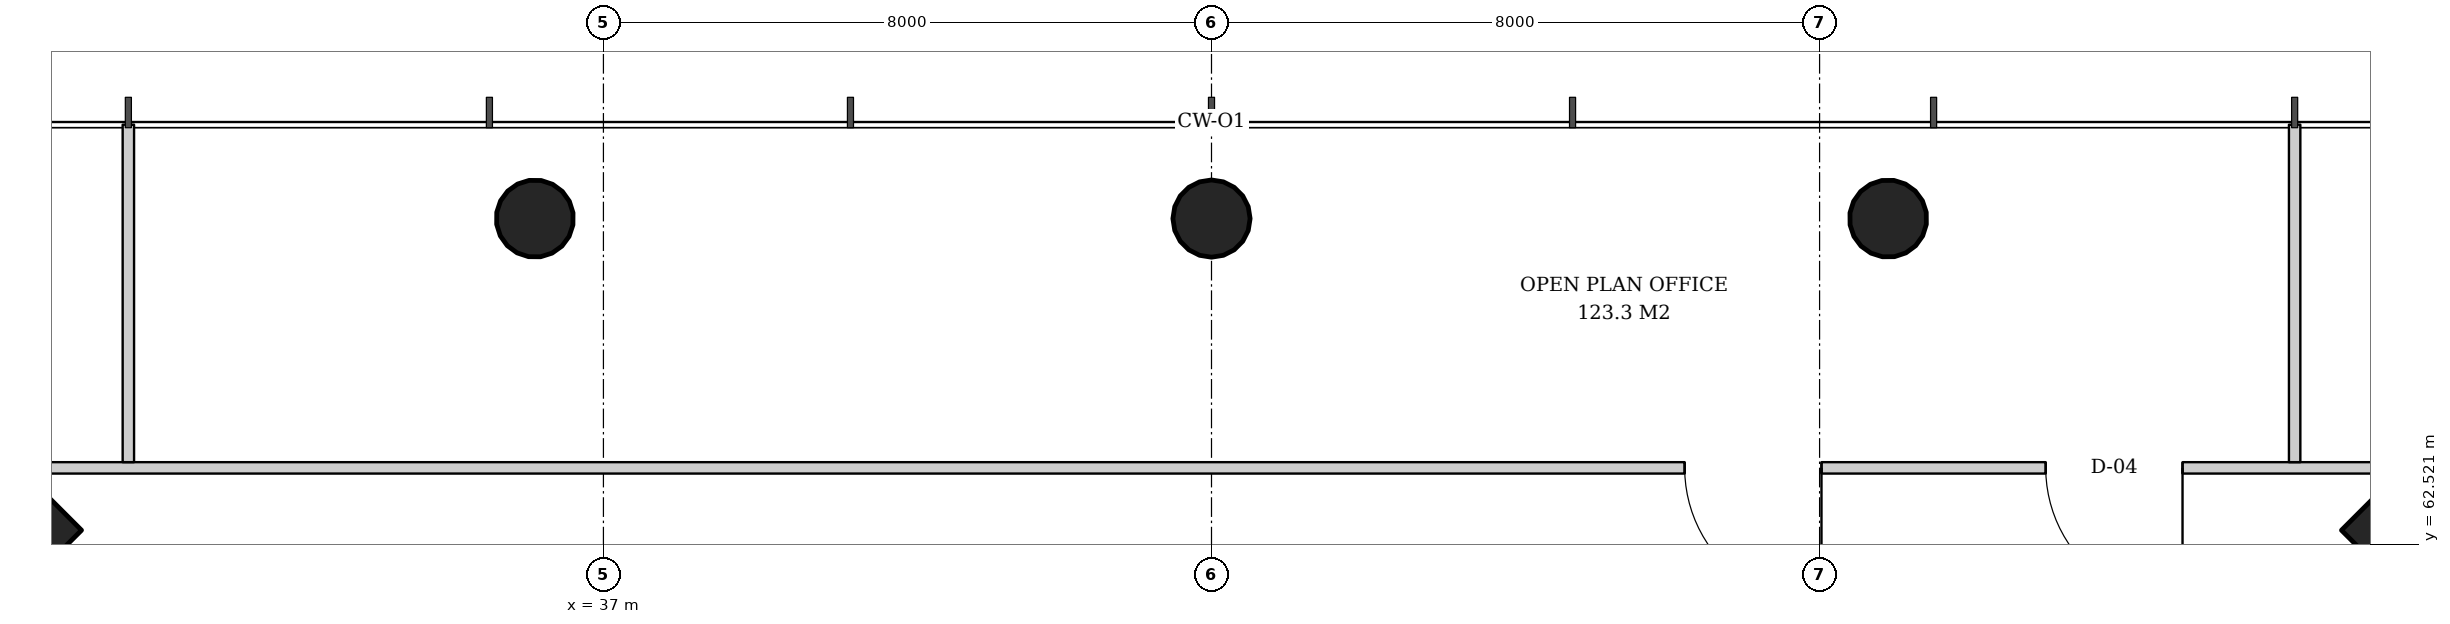
"""IFC4 building model, lengths in metres.
Left out: names, types, materials, properties, quantities, classifications, styles, units other than length and angle.
Written with IfcOpenShell. Run it as: python <this file> out.ifc"""

import sys

from ifc_helpers import new_model, si_unit, direction, frame, frame_2d, origin, origin_2d, place, context, subcontext, project, spatial, rectangle, hollow_circle, extrude, element, fill, save


model = new_model("IFC4")
c1 = context("Model", 3, precision=1e-05, world=origin(), true_north=direction((0.0, 1.0)))
c2 = subcontext(c1, "Body", "Model", "MODEL_VIEW")
j1 = project(units=[si_unit("LENGTHUNIT", "METRE"), si_unit("PLANEANGLEUNIT", "RADIAN")], contexts=[c1])
p1 = place(None, origin())
s1 = spatial("IfcSite", under=j1, at=p1, CompositionType="ELEMENT")
p2 = place(p1, origin())
s2 = spatial("IfcBuilding", under=s1, at=p2, CompositionType="ELEMENT")
p3 = place(p2, frame((0.0, 0.0, 119.8)))
s3 = spatial("IfcBuildingStorey", under=s2, at=p3, CompositionType="ELEMENT", Elevation=119.8)
for number, where, z_axis, x_axis in (
    (1, (61.743, 62.743, 0.0), (-0.032, -0.032, 0.999), (0.707, -0.707, 0.0)),
    (2, (28.257, 62.743, 0.0), (0.032, -0.032, 0.999), (0.707, 0.707, 0.0)),
):
    element("IfcColumn", number, at=place(p3, frame(where, z_axis=z_axis, x_axis=x_axis)), inside=s3, PredefinedType="COLUMN", context=c2, shape_type="SweptSolid", body=[
        extrude(rectangle(XDim=2.6, YDim=2.6, at=origin_2d()), origin(), (0.0, 0.0, 1.0), 3.804),
    ])
p4 = place(p3, frame((53.921, 66.843, 0.0), z_axis=(-0.015987237665, -0.031910269556, 0.999362868496), x_axis=(0.894067115991, -0.447933021895, 0.0)))
e3 = element("IfcColumn", 3, at=p4, inside=s3, PredefinedType="COLUMN", context=c2, shape_type="SweptSolid", body=[
    extrude(hollow_circle(Radius=0.508, WallThickness=0.04, at=origin_2d()), origin(), (0.0, 0.0, 1.0), 3.802),
])
p5 = place(p3, frame((45.0, 66.843, 0.0), z_axis=(0.0, -0.031914348339, 0.999490607445), x_axis=(1.0, 0.0, 0.0)))
e4 = element("IfcColumn", 4, at=p5, inside=s3, PredefinedType="COLUMN", context=c2, shape_type="SweptSolid", body=[
    extrude(hollow_circle(Radius=0.508, WallThickness=0.04, at=origin_2d()), origin(), (0.0, 0.0, 1.0), 3.802),
])
p6 = place(p3, frame((36.079, 66.843, 0.0), z_axis=(0.015987237665, -0.031910269556, 0.999362868496), x_axis=(0.894067115991, 0.447933021895, 0.0)))
e5 = element("IfcColumn", 5, at=p6, inside=s3, PredefinedType="COLUMN", context=c2, shape_type="SweptSolid", body=[
    extrude(hollow_circle(Radius=0.508, WallThickness=0.04, at=origin_2d()), origin(), (0.0, 0.0, 1.0), 3.802),
])
p7 = place(p3, frame((60.612, 63.525, 0.0), z_axis=(0.0, 0.0, 1.0), x_axis=(-1.0, 0.0, 0.0)))
e6 = element("IfcWall", 6, at=p7, inside=s3, PredefinedType="PARTITIONING", context=c2, shape_type="SweptSolid", body=[
    extrude(rectangle(XDim=31.223, YDim=0.15, at=frame_2d((15.612, 0.0))), origin(), (0.0, 0.0, 1.0), 2.72),
])
p8 = place(p7, frame((2.836, 0.0, 0.0)))
e7 = element("IfcOpeningElement", 7, at=p8, cuts=e6, PredefinedType="OPENING", context=c2, shape_type="SweptSolid", body=[
    extrude(rectangle(XDim=1.8, YDim=2.4, at=frame_2d((0.9, 1.2))), frame((0.0, 0.085, 0.0), z_axis=(0.0, -1.0, 0.0), x_axis=(1.0, 0.0, 0.0)), (0.0, 0.0, 1.0), 0.17),
])
p9 = place(p7, frame((7.586, 0.0, 0.0)))
e8 = element("IfcOpeningElement", 8, at=p9, cuts=e6, PredefinedType="OPENING", context=c2, shape_type="SweptSolid", body=[
    extrude(rectangle(XDim=1.8, YDim=2.4, at=frame_2d((0.9, 1.2))), frame((0.0, 0.085, 0.0), z_axis=(0.0, -1.0, 0.0), x_axis=(1.0, 0.0, 0.0)), (0.0, 0.0, 1.0), 0.17),
])
for number, where, z_axis, x_axis in (
    (9, (59.25, 63.6, 0.0), (0.0, 0.0, 1.0), (0.0, 1.0, 0.0)),
    (10, (30.75, 63.6, 0.0), (0.0, 0.0, 1.0), (0.0, 1.0, 0.0)),
):
    element("IfcWall", number, at=place(p3, frame(where, z_axis=z_axis, x_axis=x_axis)), inside=s3, PredefinedType="PARTITIONING", context=c2, shape_type="SweptSolid", body=[
        extrude(rectangle(XDim=4.44, YDim=0.15, at=frame_2d((2.22, 0.0))), origin(), (0.0, 0.0, 1.0), 2.82),
    ])
p10 = place(p8, origin())
e11 = element("IfcDoor", 11, at=p10, inside=s3, OperationType="DOUBLE_DOOR_SINGLE_SWING", PredefinedType="DOOR", context=c2, shape_type="SweptSolid", body=[
    extrude(rectangle(XDim=1.8, YDim=2.4, at=frame_2d((0.9, 1.2))), frame((0.0, 0.025, 0.0), z_axis=(0.0, -1.0, 0.0), x_axis=(1.0, 0.0, 0.0)), (0.0, 0.0, 1.0), 0.05),
])
fill(e7, e11)
p11 = place(p9, origin())
e12 = element("IfcDoor", 12, at=p11, inside=s3, OperationType="DOUBLE_DOOR_SINGLE_SWING", PredefinedType="DOOR", context=c2, shape_type="SweptSolid", body=[
    extrude(rectangle(XDim=1.8, YDim=2.4, at=frame_2d((0.9, 1.2))), frame((0.0, 0.025, 0.0), z_axis=(0.0, -1.0, 0.0), x_axis=(1.0, 0.0, 0.0)), (0.0, 0.0, 1.0), 0.05),
])
fill(e8, e12)
save(model, sys.argv[1])
